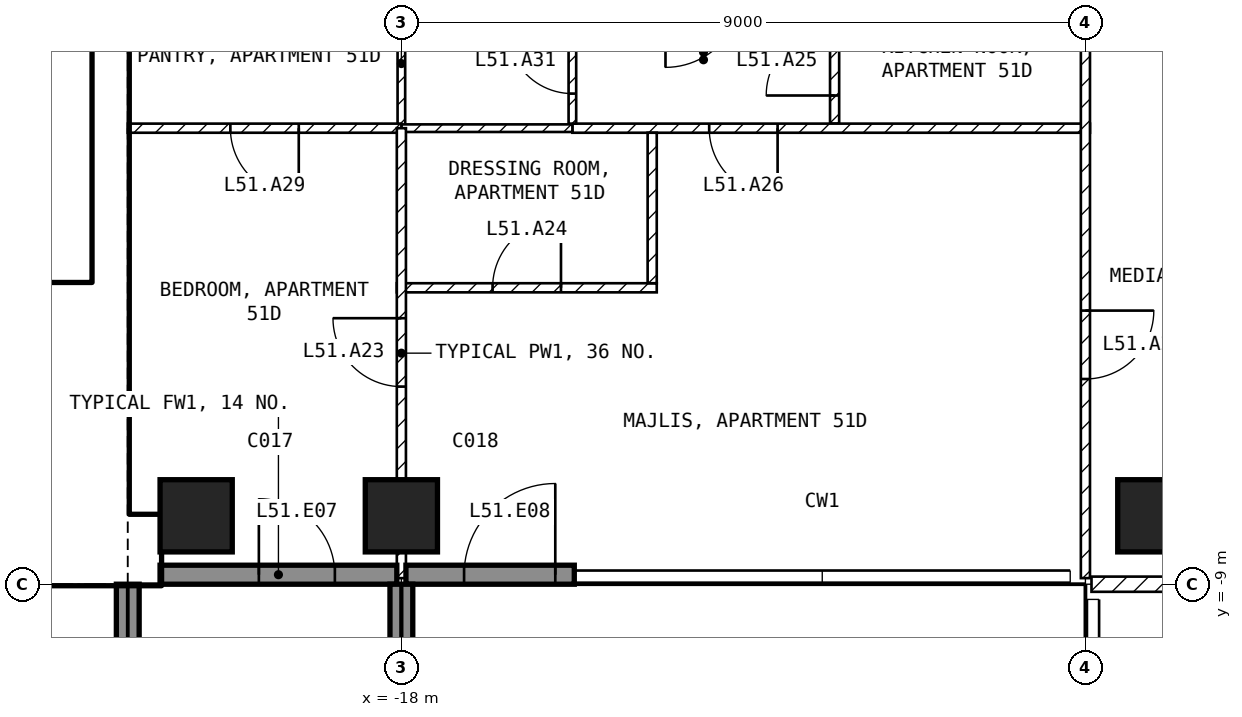
"""IFC4 building model, lengths in metres.
Left out: names, types, materials, properties, quantities, classifications, styles, units other than length and angle.
Written with IfcOpenShell. Run it as: python <this file> out.ifc"""

import sys

from ifc_helpers import new_model, si_unit, direction, frame, frame_2d, origin, origin_2d, place, context, subcontext, project, spatial, rectangle, extrude, element, fill, save


model = new_model("IFC4")
c1 = context("Model", 3, precision=1e-05, world=origin(), true_north=direction((0.0, 1.0)))
c2 = subcontext(c1, "Body", "Model", "MODEL_VIEW")
j1 = project(units=[si_unit("LENGTHUNIT", "METRE"), si_unit("PLANEANGLEUNIT", "RADIAN")], contexts=[c1])
p1 = place(None, origin())
s1 = spatial("IfcSite", under=j1, at=p1, CompositionType="ELEMENT")
p2 = place(p1, origin())
s2 = spatial("IfcBuilding", under=s1, at=p2, CompositionType="ELEMENT")
p3 = place(p2, frame((0.0, 0.0, 205.1)))
s3 = spatial("IfcBuildingStorey", under=s2, at=p3, CompositionType="ELEMENT", Elevation=205.1)
for number, where, z_axis, x_axis in (
    (1, (-20.7, -8.1, -0.25), (0.0, 0.0, 1.0), (1.0, 0.0, 0.0)),
    (2, (-18.0, -8.1, -0.25), (0.0, 0.0, 1.0), (1.0, 0.0, 0.0)),
    (3, (-8.1, -8.1, -0.25), (0.0, 0.0, 1.0), (1.0, 0.0, 0.0)),
):
    element("IfcColumn", number, at=place(p3, frame(where, z_axis=z_axis, x_axis=x_axis)), inside=s3, PredefinedType="COLUMN", context=c2, shape_type="SweptSolid", body=[
        extrude(rectangle(XDim=0.95, YDim=0.95, at=origin_2d()), origin(), (0.0, 0.0, 1.0), 3.5),
    ])
p4 = place(p3, frame((-21.175, -8.875, 0.0), z_axis=(0.0, 0.0, 1.0), x_axis=(1.0, 0.0, 0.0)))
e4 = element("IfcWall", 4, at=p4, inside=s3, PredefinedType="SOLIDWALL", context=c2, shape_type="SweptSolid", body=[
    extrude(rectangle(XDim=3.115, YDim=0.25, at=frame_2d((1.558, 0.0))), origin(), (0.0, 0.0, 1.0), 3.25),
])
p5 = place(p4, frame((1.3, 0.0, 0.0)))
e5 = element("IfcOpeningElement", 5, at=p5, cuts=e4, PredefinedType="OPENING", context=c2, shape_type="SweptSolid", body=[
    extrude(rectangle(XDim=1.0, YDim=2.4, at=frame_2d((0.5, 1.2))), frame((0.0, 0.135, 0.0), z_axis=(0.0, -1.0, 0.0), x_axis=(1.0, 0.0, 0.0)), (0.0, 0.0, 1.0), 0.27),
])
p6 = place(p3, frame((-17.94, -8.875, 0.0), z_axis=(0.0, 0.0, 1.0), x_axis=(1.0, 0.0, 0.0)))
e6 = element("IfcWall", 6, at=p6, inside=s3, PredefinedType="SOLIDWALL", context=c2, shape_type="SweptSolid", body=[
    extrude(rectangle(XDim=2.215, YDim=0.25, at=frame_2d((1.107, 0.0))), origin(), (0.0, 0.0, 1.0), 3.25),
])
p7 = place(p6, frame((0.765, 0.0, 0.0)))
e7 = element("IfcOpeningElement", 7, at=p7, cuts=e6, PredefinedType="OPENING", context=c2, shape_type="SweptSolid", body=[
    extrude(rectangle(XDim=1.2, YDim=2.4, at=frame_2d((0.6, 1.2))), frame((0.0, 0.135, 0.0), z_axis=(0.0, -1.0, 0.0), x_axis=(1.0, 0.0, 0.0)), (0.0, 0.0, 1.0), 0.27),
])
for number, where, z_axis, x_axis in (
    (8, (-21.6, -9.0, 0.0), (0.0, 0.0, 1.0), (0.0, -1.0, 0.0)),
    (9, (-18.0, -9.0, 0.0), (0.0, 0.0, 1.0), (0.0, -1.0, 0.0)),
):
    element("IfcWall", number, at=place(p3, frame(where, z_axis=z_axis, x_axis=x_axis)), inside=s3, PredefinedType="SOLIDWALL", context=c2, shape_type="SweptSolid", body=[
        extrude(rectangle(XDim=2.7, YDim=0.3, at=frame_2d((1.35, 0.0))), origin(), (0.0, 0.0, 1.0), 3.25),
    ])
p8 = place(p3, frame((-30.2, -8.55, 0.0), z_axis=(0.0, 0.0, 1.0), x_axis=(1.0, 0.0, 0.0)))
e10 = element("IfcWall", 10, at=p8, inside=s3, PredefinedType="SHEAR", context=c2, shape_type="SweptSolid", body=[
    extrude(rectangle(XDim=9.025, YDim=0.9, at=frame_2d((4.512, 0.0))), origin(), (0.0, 0.0, 1.0), 3.25),
])
p9 = place(p3, frame((-21.825, -8.1, 0.0), z_axis=(0.0, 0.0, 1.0), x_axis=(0.0, 1.0, 0.0)))
e11 = element("IfcWall", 11, at=p9, inside=s3, PredefinedType="SHEAR", context=c2, shape_type="SweptSolid", body=[
    extrude(rectangle(XDim=6.9, YDim=0.45, at=frame_2d((3.45, 0.0))), origin(), (0.0, 0.0, 1.0), 3.25),
])
p10 = place(p3, frame((-28.35, -5.15, 0.0), z_axis=(0.0, 0.0, 1.0), x_axis=(1.0, 0.0, 0.0)))
e12 = element("IfcWall", 12, at=p10, inside=s3, PredefinedType="SOLIDWALL", context=c2, shape_type="SweptSolid", body=[
    extrude(rectangle(XDim=6.3, YDim=0.2, at=frame_2d((3.15, 0.0))), origin(), (0.0, 0.0, 1.0), 3.25),
])
p11 = place(p10, frame((5.1, 0.0, 0.0)))
e13 = element("IfcOpeningElement", 13, at=p11, cuts=e12, PredefinedType="OPENING", context=c2, shape_type="SweptSolid", body=[
    extrude(rectangle(XDim=1.0, YDim=2.1, at=frame_2d((0.5, 1.05))), frame((0.0, 0.11, 0.0), z_axis=(0.0, -1.0, 0.0), x_axis=(1.0, 0.0, 0.0)), (0.0, 0.0, 1.0), 0.22),
])
p12 = place(p3, frame((8.92, -9.0, 0.0), z_axis=(0.0, 0.0, 1.0), x_axis=(-1.0, 0.0, 0.0)))
e14 = element("IfcWall", 14, at=p12, inside=s3, PredefinedType="PARTITIONING", context=c2, shape_type="SweptSolid", body=[
    extrude(rectangle(XDim=17.84, YDim=0.2, at=frame_2d((8.92, 0.0))), origin(), (0.0, 0.0, 1.0), 3.25),
])
p13 = place(p12, frame((8.42, 0.0, 0.0)))
e15 = element("IfcOpeningElement", 15, at=p13, cuts=e14, PredefinedType="OPENING", context=c2, shape_type="SweptSolid", body=[
    extrude(rectangle(XDim=1.0, YDim=2.1, at=frame_2d((0.5, 1.05))), frame((0.0, 0.11, 0.0), z_axis=(0.0, -1.0, 0.0), x_axis=(1.0, 0.0, 0.0)), (0.0, 0.0, 1.0), 0.22),
])
p14 = place(p3, frame((-12.3, -2.94, 0.0), z_axis=(0.0, 0.0, 1.0), x_axis=(0.0, 1.0, 0.0)))
e16 = element("IfcWall", 16, at=p14, inside=s3, PredefinedType="PARTITIONING", context=c2, shape_type="SweptSolid", body=[
    extrude(rectangle(XDim=1.64, YDim=0.12, at=frame_2d((0.82, 0.0))), origin(), (0.0, 0.0, 1.0), 3.25),
])
p15 = place(p14, frame((0.37, 0.0, 0.0)))
e17 = element("IfcOpeningElement", 17, at=p15, cuts=e16, PredefinedType="OPENING", context=c2, shape_type="SweptSolid", body=[
    extrude(rectangle(XDim=0.9, YDim=2.1, at=frame_2d((0.45, 1.05))), frame((0.0, 0.07, 0.0), z_axis=(0.0, -1.0, 0.0), x_axis=(1.0, 0.0, 0.0)), (0.0, 0.0, 1.0), 0.14),
])
p16 = place(p3, frame((-8.94, -3.0, 0.0), z_axis=(0.0, 0.0, 1.0), x_axis=(-1.0, 0.0, 0.0)))
e18 = element("IfcWall", 18, at=p16, inside=s3, PredefinedType="PARTITIONING", context=c2, shape_type="SweptSolid", body=[
    extrude(rectangle(XDim=6.81, YDim=0.12, at=frame_2d((3.405, 0.0))), origin(), (0.0, 0.0, 1.0), 3.25),
])
p17 = place(p16, frame((4.11, 0.0, 0.0)))
e19 = element("IfcOpeningElement", 19, at=p17, cuts=e18, PredefinedType="OPENING", context=c2, shape_type="SweptSolid", body=[
    extrude(rectangle(XDim=0.9, YDim=2.1, at=frame_2d((0.45, 1.05))), frame((0.0, 0.07, 0.0), z_axis=(0.0, -1.0, 0.0), x_axis=(1.0, 0.0, 0.0)), (0.0, 0.0, 1.0), 0.14),
])
p18 = place(p3, frame((-9.0, -1.3, 0.0), z_axis=(0.0, 0.0, 1.0), x_axis=(0.0, -1.0, 0.0)))
e20 = element("IfcWall", 20, at=p18, inside=s3, PredefinedType="PARTITIONING", context=c2, shape_type="SweptSolid", body=[
    extrude(rectangle(XDim=7.62, YDim=0.12, at=frame_2d((3.81, 0.0))), origin(), (0.0, 0.0, 1.0), 3.25),
])
p19 = place(p18, frame((4.1, 0.0, 0.0)))
e21 = element("IfcOpeningElement", 21, at=p19, cuts=e20, PredefinedType="OPENING", context=c2, shape_type="SweptSolid", body=[
    extrude(rectangle(XDim=0.9, YDim=2.1, at=frame_2d((0.45, 1.05))), frame((0.0, 0.07, 0.0), z_axis=(0.0, -1.0, 0.0), x_axis=(1.0, 0.0, 0.0)), (0.0, 0.0, 1.0), 0.14),
])
p20 = place(p3, frame((-15.75, -2.94, 0.0), z_axis=(0.0, 0.0, 1.0), x_axis=(0.0, 1.0, 0.0)))
e22 = element("IfcWall", 22, at=p20, inside=s3, PredefinedType="PARTITIONING", context=c2, shape_type="SweptSolid", body=[
    extrude(rectangle(XDim=1.64, YDim=0.1, at=frame_2d((0.82, 0.0))), origin(), (0.0, 0.0, 1.0), 3.25),
])
p21 = place(p20, frame((0.395, 0.0, 0.0)))
e23 = element("IfcOpeningElement", 23, at=p21, cuts=e22, PredefinedType="OPENING", context=c2, shape_type="SweptSolid", body=[
    extrude(rectangle(XDim=0.85, YDim=2.1, at=frame_2d((0.425, 1.05))), frame((0.0, 0.06, 0.0), z_axis=(0.0, -1.0, 0.0), x_axis=(1.0, 0.0, 0.0)), (0.0, 0.0, 1.0), 0.12),
])
p22 = place(p3, frame((-18.0, -3.0, 0.0), z_axis=(0.0, 0.0, 1.0), x_axis=(0.0, 1.0, 0.0)))
e24 = element("IfcWall", 24, at=p22, inside=s3, PredefinedType="PARTITIONING", context=c2, shape_type="SweptSolid", body=[
    extrude(rectangle(XDim=1.7, YDim=0.1, at=frame_2d((0.85, 0.0))), origin(), (0.0, 0.0, 1.0), 2.48),
])
p23 = place(p3, frame((-15.75, -3.0, 0.0), z_axis=(0.0, 0.0, 1.0), x_axis=(-1.0, 0.0, 0.0)))
e25 = element("IfcWall", 25, at=p23, inside=s3, PredefinedType="PARTITIONING", context=c2, shape_type="SweptSolid", body=[
    extrude(rectangle(XDim=2.25, YDim=0.1, at=frame_2d((1.125, 0.0))), origin(), (0.0, 0.0, 1.0), 3.25),
])
p24 = place(p3, frame((-18.0, -3.0, 0.0), z_axis=(0.0, 0.0, 1.0), x_axis=(-1.0, 0.0, 0.0)))
e26 = element("IfcWall", 26, at=p24, inside=s3, PredefinedType="PARTITIONING", context=c2, shape_type="SweptSolid", body=[
    extrude(rectangle(XDim=3.6, YDim=0.12, at=frame_2d((1.8, 0.0))), origin(), (0.0, 0.0, 1.0), 3.25),
])
p25 = place(p24, frame((1.35, 0.0, 0.0)))
e27 = element("IfcOpeningElement", 27, at=p25, cuts=e26, PredefinedType="OPENING", context=c2, shape_type="SweptSolid", body=[
    extrude(rectangle(XDim=0.9, YDim=2.1, at=frame_2d((0.45, 1.05))), frame((0.0, 0.07, 0.0), z_axis=(0.0, -1.0, 0.0), x_axis=(1.0, 0.0, 0.0)), (0.0, 0.0, 1.0), 0.14),
])
p26 = place(p3, frame((-18.06, -5.1, 0.0), z_axis=(0.0, 0.0, 1.0), x_axis=(1.0, 0.0, 0.0)))
e28 = element("IfcWall", 28, at=p26, inside=s3, PredefinedType="PARTITIONING", context=c2, shape_type="SweptSolid", body=[
    extrude(rectangle(XDim=3.42, YDim=0.12, at=frame_2d((1.71, 0.0))), origin(), (0.0, 0.0, 1.0), 3.25),
])
p27 = place(p26, frame((1.26, 0.0, 0.0)))
e29 = element("IfcOpeningElement", 29, at=p27, cuts=e28, PredefinedType="OPENING", context=c2, shape_type="SweptSolid", body=[
    extrude(rectangle(XDim=0.9, YDim=2.1, at=frame_2d((0.45, 1.05))), frame((0.0, 0.07, 0.0), z_axis=(0.0, -1.0, 0.0), x_axis=(1.0, 0.0, 0.0)), (0.0, 0.0, 1.0), 0.14),
])
p28 = place(p3, frame((-14.7, -5.04, 0.0), z_axis=(0.0, 0.0, 1.0), x_axis=(0.0, 1.0, 0.0)))
e30 = element("IfcWall", 30, at=p28, inside=s3, PredefinedType="PARTITIONING", context=c2, shape_type="SweptSolid", body=[
    extrude(rectangle(XDim=1.98, YDim=0.12, at=frame_2d((0.99, 0.0))), origin(), (0.0, 0.0, 1.0), 3.25),
])
p29 = place(p3, frame((-18.0, -8.92, 0.0), z_axis=(0.0, 0.0, 1.0), x_axis=(0.0, 1.0, 0.0)))
e31 = element("IfcWall", 31, at=p29, inside=s3, PredefinedType="PARTITIONING", context=c2, shape_type="SweptSolid", body=[
    extrude(rectangle(XDim=5.92, YDim=0.12, at=frame_2d((2.96, 0.0))), origin(), (0.0, 0.0, 1.0), 2.48),
])
p30 = place(p29, frame((2.52, 0.0, 0.0)))
e32 = element("IfcOpeningElement", 32, at=p30, cuts=e31, PredefinedType="OPENING", context=c2, shape_type="SweptSolid", body=[
    extrude(rectangle(XDim=0.9, YDim=2.1, at=frame_2d((0.45, 1.05))), frame((0.0, 0.07, 0.0), z_axis=(0.0, -1.0, 0.0), x_axis=(1.0, 0.0, 0.0)), (0.0, 0.0, 1.0), 0.14),
])
p31 = place(p5, origin())
e33 = element("IfcDoor", 33, at=p31, inside=s3, OperationType="SINGLE_SWING_LEFT", PredefinedType="DOOR", context=c2, shape_type="SweptSolid", body=[
    extrude(rectangle(XDim=1.0, YDim=2.4, at=frame_2d((0.5, 1.2))), frame((0.0, 0.025, 0.0), z_axis=(0.0, -1.0, 0.0), x_axis=(1.0, 0.0, 0.0)), (0.0, 0.0, 1.0), 0.05),
])
fill(e5, e33)
p32 = place(p7, origin())
e34 = element("IfcDoor", 34, at=p32, inside=s3, OperationType="SINGLE_SWING_RIGHT", PredefinedType="DOOR", context=c2, shape_type="SweptSolid", body=[
    extrude(rectangle(XDim=1.2, YDim=2.4, at=frame_2d((0.6, 1.2))), frame((0.0, 0.025, 0.0), z_axis=(0.0, -1.0, 0.0), x_axis=(1.0, 0.0, 0.0)), (0.0, 0.0, 1.0), 0.05),
])
fill(e7, e34)
p33 = place(p11, origin())
e35 = element("IfcDoor", 35, at=p33, inside=s3, OperationType="SINGLE_SWING_LEFT", PredefinedType="DOOR", context=c2, shape_type="SweptSolid", body=[
    extrude(rectangle(XDim=1.0, YDim=2.1, at=frame_2d((0.5, 1.05))), frame((0.0, 0.025, 0.0), z_axis=(0.0, -1.0, 0.0), x_axis=(1.0, 0.0, 0.0)), (0.0, 0.0, 1.0), 0.05),
])
fill(e13, e35)
p34 = place(p30, origin())
e36 = element("IfcDoor", 36, at=p34, inside=s3, OperationType="SINGLE_SWING_RIGHT", PredefinedType="DOOR", context=c2, shape_type="SweptSolid", body=[
    extrude(rectangle(XDim=0.9, YDim=2.1, at=frame_2d((0.45, 1.05))), frame((0.0, 0.025, 0.0), z_axis=(0.0, -1.0, 0.0), x_axis=(1.0, 0.0, 0.0)), (0.0, 0.0, 1.0), 0.05),
])
fill(e32, e36)
p35 = place(p27, origin())
e37 = element("IfcDoor", 37, at=p35, inside=s3, OperationType="SINGLE_SWING_RIGHT", PredefinedType="DOOR", context=c2, shape_type="SweptSolid", body=[
    extrude(rectangle(XDim=0.9, YDim=2.1, at=frame_2d((0.45, 1.05))), frame((0.0, 0.025, 0.0), z_axis=(0.0, -1.0, 0.0), x_axis=(1.0, 0.0, 0.0)), (0.0, 0.0, 1.0), 0.05),
])
fill(e29, e37)
p36 = place(p15, origin())
e38 = element("IfcDoor", 38, at=p36, inside=s3, OperationType="SINGLE_SWING_LEFT", PredefinedType="DOOR", context=c2, shape_type="SweptSolid", body=[
    extrude(rectangle(XDim=0.9, YDim=2.1, at=frame_2d((0.45, 1.05))), frame((0.0, 0.025, 0.0), z_axis=(0.0, -1.0, 0.0), x_axis=(1.0, 0.0, 0.0)), (0.0, 0.0, 1.0), 0.05),
])
fill(e17, e38)
p37 = place(p17, origin())
e39 = element("IfcDoor", 39, at=p37, inside=s3, OperationType="SINGLE_SWING_LEFT", PredefinedType="DOOR", context=c2, shape_type="SweptSolid", body=[
    extrude(rectangle(XDim=0.9, YDim=2.1, at=frame_2d((0.45, 1.05))), frame((0.0, 0.025, 0.0), z_axis=(0.0, -1.0, 0.0), x_axis=(1.0, 0.0, 0.0)), (0.0, 0.0, 1.0), 0.05),
])
fill(e19, e39)
p38 = place(p19, origin())
e40 = element("IfcDoor", 40, at=p38, inside=s3, OperationType="SINGLE_SWING_LEFT", PredefinedType="DOOR", context=c2, shape_type="SweptSolid", body=[
    extrude(rectangle(XDim=0.9, YDim=2.1, at=frame_2d((0.45, 1.05))), frame((0.0, 0.025, 0.0), z_axis=(0.0, -1.0, 0.0), x_axis=(1.0, 0.0, 0.0)), (0.0, 0.0, 1.0), 0.05),
])
fill(e21, e40)
p39 = place(p25, origin())
e41 = element("IfcDoor", 41, at=p39, inside=s3, OperationType="SINGLE_SWING_LEFT", PredefinedType="DOOR", context=c2, shape_type="SweptSolid", body=[
    extrude(rectangle(XDim=0.9, YDim=2.1, at=frame_2d((0.45, 1.05))), frame((0.0, 0.025, 0.0), z_axis=(0.0, -1.0, 0.0), x_axis=(1.0, 0.0, 0.0)), (0.0, 0.0, 1.0), 0.05),
])
fill(e27, e41)
p40 = place(p21, origin())
e42 = element("IfcDoor", 42, at=p40, inside=s3, OperationType="SINGLE_SWING_RIGHT", PredefinedType="DOOR", context=c2, shape_type="SweptSolid", body=[
    extrude(rectangle(XDim=0.85, YDim=2.1, at=frame_2d((0.425, 1.05))), frame((0.0, 0.025, 0.0), z_axis=(0.0, -1.0, 0.0), x_axis=(1.0, 0.0, 0.0)), (0.0, 0.0, 1.0), 0.05),
])
fill(e23, e42)
save(model, sys.argv[1])
